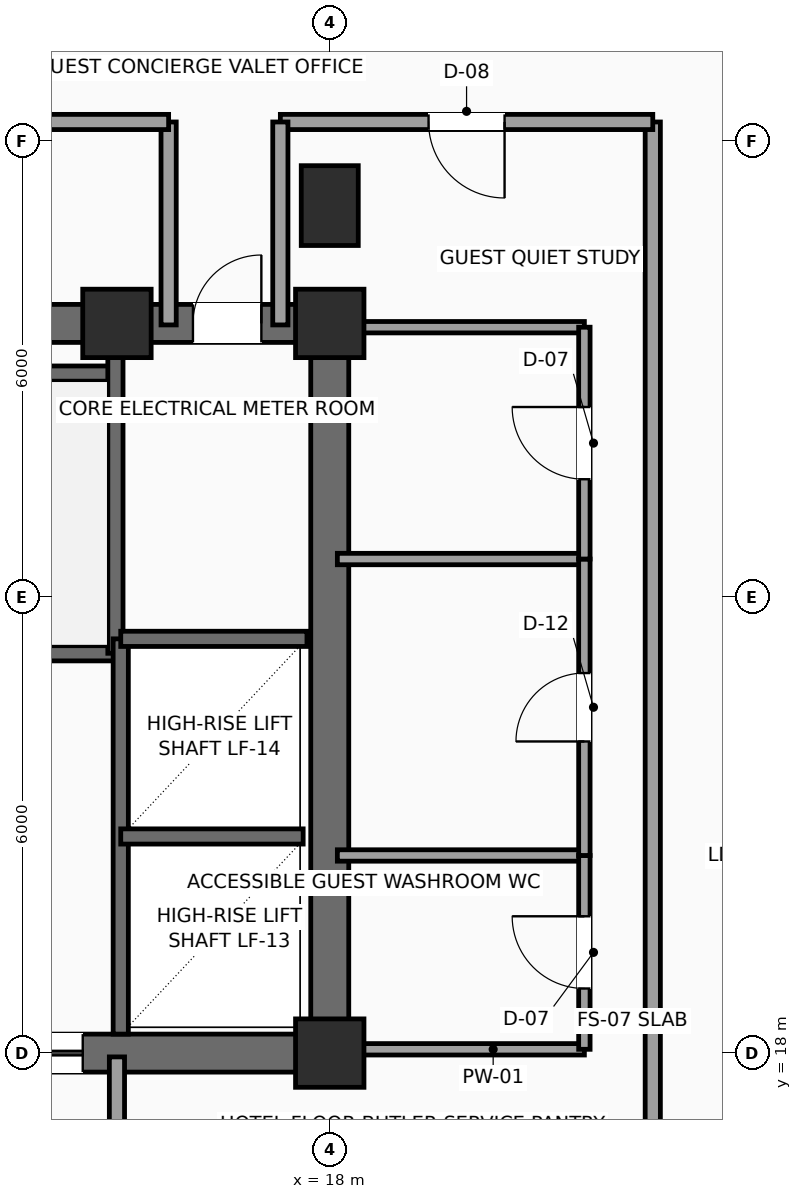
"""IFC4 building model, lengths in metres.
Left out: names, types, materials, properties, quantities, classifications, styles, units other than length and angle.
Written with IfcOpenShell. Run it as: python <this file> out.ifc"""

import sys

from ifc_helpers import new_model, si_unit, direction, frame, frame_2d, origin, origin_2d, place, context, subcontext, project, spatial, rectangle, extrude, element, fill, save


model = new_model("IFC4")
c1 = context("Model", 3, precision=1e-05, world=origin(), true_north=direction((0.0, 1.0)))
c2 = subcontext(c1, "Body", "Model", "MODEL_VIEW")
j1 = project(units=[si_unit("LENGTHUNIT", "METRE"), si_unit("PLANEANGLEUNIT", "RADIAN")], contexts=[c1])
p1 = place(None, origin())
s1 = spatial("IfcSite", under=j1, at=p1, CompositionType="ELEMENT")
p2 = place(p1, origin())
s2 = spatial("IfcBuilding", under=s1, at=p2, CompositionType="ELEMENT")
p3 = place(p2, frame((0.0, 0.0, 169.2)))
s3 = spatial("IfcBuildingStorey", under=s2, at=p3, CompositionType="ELEMENT", Elevation=169.2)
for number, where, z_axis, x_axis in (
    (1, (18.0, 18.0, 0.0), (0.0, 0.0, 1.0), (1.0, 0.0, 0.0)),
    (2, (15.2, 27.6, 0.0), (0.0, 0.0, 1.0), (1.0, 0.0, 0.0)),
    (3, (18.0, 27.6, 0.0), (0.0, 0.0, 1.0), (1.0, 0.0, 0.0)),
):
    element("IfcColumn", number, at=place(p3, frame(where, z_axis=z_axis, x_axis=x_axis)), inside=s3, PredefinedType="COLUMN", context=c2, shape_type="SweptSolid", body=[
        extrude(rectangle(XDim=0.9, YDim=0.9, at=origin_2d()), origin(), (0.0, 0.0, 1.0), 3.75),
    ])
p4 = place(p3, frame((18.0, 29.15, 0.0), z_axis=(0.0, 0.0, 1.0), x_axis=(1.0, 0.0, 0.0)))
e4 = element("IfcColumn", 4, at=p4, inside=s3, PredefinedType="COLUMN", context=c2, shape_type="SweptSolid", body=[
    extrude(rectangle(XDim=0.75, YDim=1.05, at=origin_2d()), origin(), (0.0, 0.0, 1.0), 3.75),
])
p5 = place(p3, frame((6.0, 18.0, 0.0), z_axis=(0.0, 0.0, 1.0), x_axis=(1.0, 0.0, 0.0)))
e5 = element("IfcWall", 5, at=p5, inside=s3, PredefinedType="SHEAR", context=c2, shape_type="SweptSolid", body=[
    extrude(rectangle(XDim=12.0, YDim=0.5, at=frame_2d((6.0, 0.0))), origin(), (0.0, 0.0, 1.0), 3.54),
])
p6 = place(p5, frame((7.15, 0.0, 0.0)))
e6 = element("IfcOpeningElement", 6, at=p6, cuts=e5, PredefinedType="OPENING", context=c2, shape_type="SweptSolid", body=[
    extrude(rectangle(XDim=1.6, YDim=2.3, at=frame_2d((0.8, 1.15))), frame((0.0, 0.26, 0.0), z_axis=(0.0, -1.0, 0.0), x_axis=(1.0, 0.0, 0.0)), (0.0, 0.0, 1.0), 0.52),
])
p7 = place(p3, frame((6.0, 27.6, 0.0), z_axis=(0.0, 0.0, 1.0), x_axis=(1.0, 0.0, 0.0)))
e7 = element("IfcWall", 7, at=p7, inside=s3, PredefinedType="SHEAR", context=c2, shape_type="SweptSolid", body=[
    extrude(rectangle(XDim=12.0, YDim=0.5, at=frame_2d((6.0, 0.0))), origin(), (0.0, 0.0, 1.0), 3.54),
])
p8 = place(p7, frame((10.2, 0.0, 0.0)))
e8 = element("IfcOpeningElement", 8, at=p8, cuts=e7, PredefinedType="OPENING", context=c2, shape_type="SweptSolid", body=[
    extrude(rectangle(XDim=0.9, YDim=2.15, at=frame_2d((0.45, 1.075))), frame((0.0, 0.26, 0.0), z_axis=(0.0, -1.0, 0.0), x_axis=(1.0, 0.0, 0.0)), (0.0, 0.0, 1.0), 0.52),
])
p9 = place(p3, frame((18.0, 18.0, 0.0), z_axis=(0.0, 0.0, 1.0), x_axis=(0.0, 1.0, 0.0)))
e9 = element("IfcWall", 9, at=p9, inside=s3, PredefinedType="SHEAR", context=c2, shape_type="SweptSolid", body=[
    extrude(rectangle(XDim=9.6, YDim=0.5, at=frame_2d((4.8, 0.0))), origin(), (0.0, 0.0, 1.0), 3.54),
])
p10 = place(p3, frame((6.3, 23.26, 0.0), z_axis=(0.0, 0.0, 1.0), x_axis=(1.0, 0.0, 0.0)))
e10 = element("IfcWall", 10, at=p10, inside=s3, PredefinedType="SHEAR", context=c2, shape_type="SweptSolid", body=[
    extrude(rectangle(XDim=8.88, YDim=0.2, at=frame_2d((4.44, 0.0))), origin(), (0.0, 0.0, 1.0), 3.54),
])
p11 = place(p10, frame((0.35, 0.0, 0.0)))
e11 = element("IfcOpeningElement", 11, at=p11, cuts=e10, PredefinedType="OPENING", context=c2, shape_type="SweptSolid", body=[
    extrude(rectangle(XDim=1.1, YDim=2.2, at=frame_2d((0.55, 1.1))), frame((0.0, 0.11, 0.0), z_axis=(0.0, -1.0, 0.0), x_axis=(1.0, 0.0, 0.0)), (0.0, 0.0, 1.0), 0.22),
])
p12 = place(p3, frame((6.3, 26.94, 0.0), z_axis=(0.0, 0.0, 1.0), x_axis=(1.0, 0.0, 0.0)))
e12 = element("IfcWall", 12, at=p12, inside=s3, PredefinedType="SHEAR", context=c2, shape_type="SweptSolid", body=[
    extrude(rectangle(XDim=8.88, YDim=0.2, at=frame_2d((4.44, 0.0))), origin(), (0.0, 0.0, 1.0), 3.54),
])
p13 = place(p3, frame((15.18, 23.26, 0.0), z_axis=(0.0, 0.0, 1.0), x_axis=(0.0, 1.0, 0.0)))
e13 = element("IfcWall", 13, at=p13, inside=s3, PredefinedType="SHEAR", context=c2, shape_type="SweptSolid", body=[
    extrude(rectangle(XDim=4.04, YDim=0.2, at=frame_2d((2.02, 0.0))), origin(), (0.0, 0.0, 1.0), 3.54),
])
p14 = place(p3, frame((15.25, 18.25, 0.0), z_axis=(0.0, 0.0, 1.0), x_axis=(0.0, 1.0, 0.0)))
e14 = element("IfcWall", 14, at=p14, inside=s3, PredefinedType="SHEAR", context=c2, shape_type="SweptSolid", body=[
    extrude(rectangle(XDim=5.2, YDim=0.2, at=frame_2d((2.6, 0.0))), origin(), (0.0, 0.0, 1.0), 3.54),
])
p15 = place(p3, frame((15.25, 20.85, 0.0), z_axis=(0.0, 0.0, 1.0), x_axis=(1.0, 0.0, 0.0)))
e15 = element("IfcWall", 15, at=p15, inside=s3, PredefinedType="SHEAR", context=c2, shape_type="SweptSolid", body=[
    extrude(rectangle(XDim=2.4, YDim=0.2, at=frame_2d((1.2, 0.0))), origin(), (0.0, 0.0, 1.0), 3.54),
])
p16 = place(p3, frame((15.25, 23.45, 0.0), z_axis=(0.0, 0.0, 1.0), x_axis=(1.0, 0.0, 0.0)))
e16 = element("IfcWall", 16, at=p16, inside=s3, PredefinedType="SHEAR", context=c2, shape_type="SweptSolid", body=[
    extrude(rectangle(XDim=2.45, YDim=0.2, at=frame_2d((1.225, 0.0))), origin(), (0.0, 0.0, 1.0), 3.54),
])
p17 = place(p3, frame((15.2, 17.95, 0.0), z_axis=(0.0, 0.0, 1.0), x_axis=(0.0, -1.0, 0.0)))
e17 = element("IfcWall", 17, at=p17, inside=s3, PredefinedType="PARTITIONING", context=c2, shape_type="SweptSolid", body=[
    extrude(rectangle(XDim=1.7, YDim=0.2, at=frame_2d((0.85, 0.0))), origin(), (0.0, 0.0, 1.0), 3.54),
])
p18 = place(p3, frame((22.25, 11.05, 0.0), z_axis=(0.0, 0.0, 1.0), x_axis=(0.0, 1.0, 0.0)))
e18 = element("IfcWall", 18, at=p18, inside=s3, PredefinedType="PARTITIONING", context=c2, shape_type="SweptSolid", body=[
    extrude(rectangle(XDim=19.2, YDim=0.2, at=frame_2d((9.6, 0.0))), origin(), (0.0, 0.0, 1.0), 3.54),
])
p19 = place(p3, frame((22.25, 30.25, 0.0), z_axis=(0.0, 0.0, 1.0), x_axis=(-1.0, 0.0, 0.0)))
e19 = element("IfcWall", 19, at=p19, inside=s3, PredefinedType="PARTITIONING", context=c2, shape_type="SweptSolid", body=[
    extrude(rectangle(XDim=4.9, YDim=0.2, at=frame_2d((2.45, 0.0))), origin(), (0.0, 0.0, 1.0), 3.54),
])
p20 = place(p19, frame((1.95, 0.0, 0.0)))
e20 = element("IfcOpeningElement", 20, at=p20, cuts=e19, PredefinedType="OPENING", context=c2, shape_type="SweptSolid", body=[
    extrude(rectangle(XDim=1.0, YDim=2.2, at=frame_2d((0.5, 1.1))), frame((0.0, 0.11, 0.0), z_axis=(0.0, -1.0, 0.0), x_axis=(1.0, 0.0, 0.0)), (0.0, 0.0, 1.0), 0.22),
])
for number, where, z_axis, x_axis in (
    (21, (17.35, 30.25, 0.0), (0.0, 0.0, 1.0), (0.0, -1.0, 0.0)),
    (22, (15.88, 27.58, 0.0), (0.0, 0.0, 1.0), (0.0, 1.0, 0.0)),
):
    element("IfcWall", number, at=place(p3, frame(where, z_axis=z_axis, x_axis=x_axis)), inside=s3, PredefinedType="PARTITIONING", context=c2, shape_type="SweptSolid", body=[
        extrude(rectangle(XDim=2.67, YDim=0.2, at=frame_2d((1.335, 0.0))), origin(), (0.0, 0.0, 1.0), 3.54),
    ])
p21 = place(p3, frame((15.88, 30.25, 0.0), z_axis=(0.0, 0.0, 1.0), x_axis=(-1.0, 0.0, 0.0)))
e23 = element("IfcWall", 23, at=p21, inside=s3, PredefinedType="PARTITIONING", context=c2, shape_type="SweptSolid", body=[
    extrude(rectangle(XDim=7.08, YDim=0.2, at=frame_2d((3.54, 0.0))), origin(), (0.0, 0.0, 1.0), 3.54),
])
p22 = place(p21, frame((2.21, 0.0, 0.0)))
e24 = element("IfcOpeningElement", 24, at=p22, cuts=e23, PredefinedType="OPENING", context=c2, shape_type="SweptSolid", body=[
    extrude(rectangle(XDim=1.0, YDim=2.2, at=frame_2d((0.5, 1.1))), frame((0.0, 0.11, 0.0), z_axis=(0.0, -1.0, 0.0), x_axis=(1.0, 0.0, 0.0)), (0.0, 0.0, 1.0), 0.22),
])
p23 = place(p3, frame((18.1, 18.05, 0.0), z_axis=(0.0, 0.0, 1.0), x_axis=(1.0, 0.0, 0.0)))
e25 = element("IfcWall", 25, at=p23, inside=s3, PredefinedType="PARTITIONING", context=c2, shape_type="SweptSolid", body=[
    extrude(rectangle(XDim=3.25, YDim=0.15, at=frame_2d((1.625, 0.0))), origin(), (0.0, 0.0, 1.0), 3.132),
])
p24 = place(p3, frame((18.1, 20.6, 0.0), z_axis=(0.0, 0.0, 1.0), x_axis=(1.0, 0.0, 0.0)))
e26 = element("IfcWall", 26, at=p24, inside=s3, PredefinedType="PARTITIONING", context=c2, shape_type="SweptSolid", body=[
    extrude(rectangle(XDim=3.25, YDim=0.15, at=frame_2d((1.625, 0.0))), origin(), (0.0, 0.0, 1.0), 3.54),
])
p25 = place(p3, frame((21.35, 18.05, 0.0), z_axis=(0.0, 0.0, 1.0), x_axis=(0.0, 1.0, 0.0)))
e27 = element("IfcWall", 27, at=p25, inside=s3, PredefinedType="PARTITIONING", context=c2, shape_type="SweptSolid", body=[
    extrude(rectangle(XDim=2.55, YDim=0.15, at=frame_2d((1.275, 0.0))), origin(), (0.0, 0.0, 1.0), 3.54),
])
p26 = place(p25, frame((0.8, 0.0, 0.0)))
e28 = element("IfcOpeningElement", 28, at=p26, cuts=e27, PredefinedType="OPENING", context=c2, shape_type="SweptSolid", body=[
    extrude(rectangle(XDim=0.95, YDim=2.15, at=frame_2d((0.475, 1.075))), frame((0.0, 0.085, 0.0), z_axis=(0.0, -1.0, 0.0), x_axis=(1.0, 0.0, 0.0)), (0.0, 0.0, 1.0), 0.17),
])
p27 = place(p3, frame((18.1, 24.5, 0.0), z_axis=(0.0, 0.0, 1.0), x_axis=(1.0, 0.0, 0.0)))
e29 = element("IfcWall", 29, at=p27, inside=s3, PredefinedType="PARTITIONING", context=c2, shape_type="SweptSolid", body=[
    extrude(rectangle(XDim=3.25, YDim=0.15, at=frame_2d((1.625, 0.0))), origin(), (0.0, 0.0, 1.0), 3.54),
])
p28 = place(p3, frame((21.35, 20.6, 0.0), z_axis=(0.0, 0.0, 1.0), x_axis=(0.0, 1.0, 0.0)))
e30 = element("IfcWall", 30, at=p28, inside=s3, PredefinedType="PARTITIONING", context=c2, shape_type="SweptSolid", body=[
    extrude(rectangle(XDim=3.9, YDim=0.15, at=frame_2d((1.95, 0.0))), origin(), (0.0, 0.0, 1.0), 3.54),
])
p29 = place(p28, frame((1.5, 0.0, 0.0)))
e31 = element("IfcOpeningElement", 31, at=p29, cuts=e30, PredefinedType="OPENING", context=c2, shape_type="SweptSolid", body=[
    extrude(rectangle(XDim=0.9, YDim=2.1, at=frame_2d((0.45, 1.05))), frame((0.0, 0.085, 0.0), z_axis=(0.0, -1.0, 0.0), x_axis=(1.0, 0.0, 0.0)), (0.0, 0.0, 1.0), 0.17),
])
p30 = place(p3, frame((18.1, 27.55, 0.0), z_axis=(0.0, 0.0, 1.0), x_axis=(1.0, 0.0, 0.0)))
e32 = element("IfcWall", 32, at=p30, inside=s3, PredefinedType="PARTITIONING", context=c2, shape_type="SweptSolid", body=[
    extrude(rectangle(XDim=3.25, YDim=0.15, at=frame_2d((1.625, 0.0))), origin(), (0.0, 0.0, 1.0), 3.54),
])
p31 = place(p3, frame((21.35, 24.5, 0.0), z_axis=(0.0, 0.0, 1.0), x_axis=(0.0, 1.0, 0.0)))
e33 = element("IfcWall", 33, at=p31, inside=s3, PredefinedType="PARTITIONING", context=c2, shape_type="SweptSolid", body=[
    extrude(rectangle(XDim=3.05, YDim=0.15, at=frame_2d((1.525, 0.0))), origin(), (0.0, 0.0, 1.0), 3.54),
])
p32 = place(p31, frame((1.05, 0.0, 0.0)))
e34 = element("IfcOpeningElement", 34, at=p32, cuts=e33, PredefinedType="OPENING", context=c2, shape_type="SweptSolid", body=[
    extrude(rectangle(XDim=0.95, YDim=2.15, at=frame_2d((0.475, 1.075))), frame((0.0, 0.085, 0.0), z_axis=(0.0, -1.0, 0.0), x_axis=(1.0, 0.0, 0.0)), (0.0, 0.0, 1.0), 0.17),
])
p33 = place(p6, origin())
e35 = element("IfcDoor", 35, at=p33, inside=s3, OperationType="DOUBLE_DOOR_SLIDING", PredefinedType="DOOR", context=c2, shape_type="SweptSolid", body=[
    extrude(rectangle(XDim=1.6, YDim=2.3, at=frame_2d((0.8, 1.15))), frame((0.0, 0.025, 0.0), z_axis=(0.0, -1.0, 0.0), x_axis=(1.0, 0.0, 0.0)), (0.0, 0.0, 1.0), 0.05),
])
fill(e6, e35)
p34 = place(p8, origin())
e36 = element("IfcDoor", 36, at=p34, inside=s3, OperationType="SINGLE_SWING_RIGHT", PredefinedType="DOOR", context=c2, shape_type="SweptSolid", body=[
    extrude(rectangle(XDim=0.9, YDim=2.15, at=frame_2d((0.45, 1.075))), frame((0.0, 0.025, 0.0), z_axis=(0.0, -1.0, 0.0), x_axis=(1.0, 0.0, 0.0)), (0.0, 0.0, 1.0), 0.05),
])
fill(e8, e36)
p35 = place(p20, origin())
e37 = element("IfcDoor", 37, at=p35, inside=s3, OperationType="SINGLE_SWING_LEFT", PredefinedType="DOOR", context=c2, shape_type="SweptSolid", body=[
    extrude(rectangle(XDim=1.0, YDim=2.2, at=frame_2d((0.5, 1.1))), frame((0.0, 0.025, 0.0), z_axis=(0.0, -1.0, 0.0), x_axis=(1.0, 0.0, 0.0)), (0.0, 0.0, 1.0), 0.05),
])
fill(e20, e37)
p36 = place(p26, origin())
e38 = element("IfcDoor", 38, at=p36, inside=s3, OperationType="SINGLE_SWING_RIGHT", PredefinedType="DOOR", context=c2, shape_type="SweptSolid", body=[
    extrude(rectangle(XDim=0.95, YDim=2.15, at=frame_2d((0.475, 1.075))), frame((0.0, 0.025, 0.0), z_axis=(0.0, -1.0, 0.0), x_axis=(1.0, 0.0, 0.0)), (0.0, 0.0, 1.0), 0.05),
])
fill(e28, e38)
p37 = place(p29, origin())
e39 = element("IfcDoor", 39, at=p37, inside=s3, OperationType="SINGLE_SWING_LEFT", PredefinedType="DOOR", context=c2, shape_type="SweptSolid", body=[
    extrude(rectangle(XDim=0.9, YDim=2.1, at=frame_2d((0.45, 1.05))), frame((0.0, 0.025, 0.0), z_axis=(0.0, -1.0, 0.0), x_axis=(1.0, 0.0, 0.0)), (0.0, 0.0, 1.0), 0.05),
])
fill(e31, e39)
p38 = place(p32, origin())
e40 = element("IfcDoor", 40, at=p38, inside=s3, OperationType="SINGLE_SWING_RIGHT", PredefinedType="DOOR", context=c2, shape_type="SweptSolid", body=[
    extrude(rectangle(XDim=0.95, YDim=2.15, at=frame_2d((0.475, 1.075))), frame((0.0, 0.025, 0.0), z_axis=(0.0, -1.0, 0.0), x_axis=(1.0, 0.0, 0.0)), (0.0, 0.0, 1.0), 0.05),
])
fill(e34, e40)
save(model, sys.argv[1])
